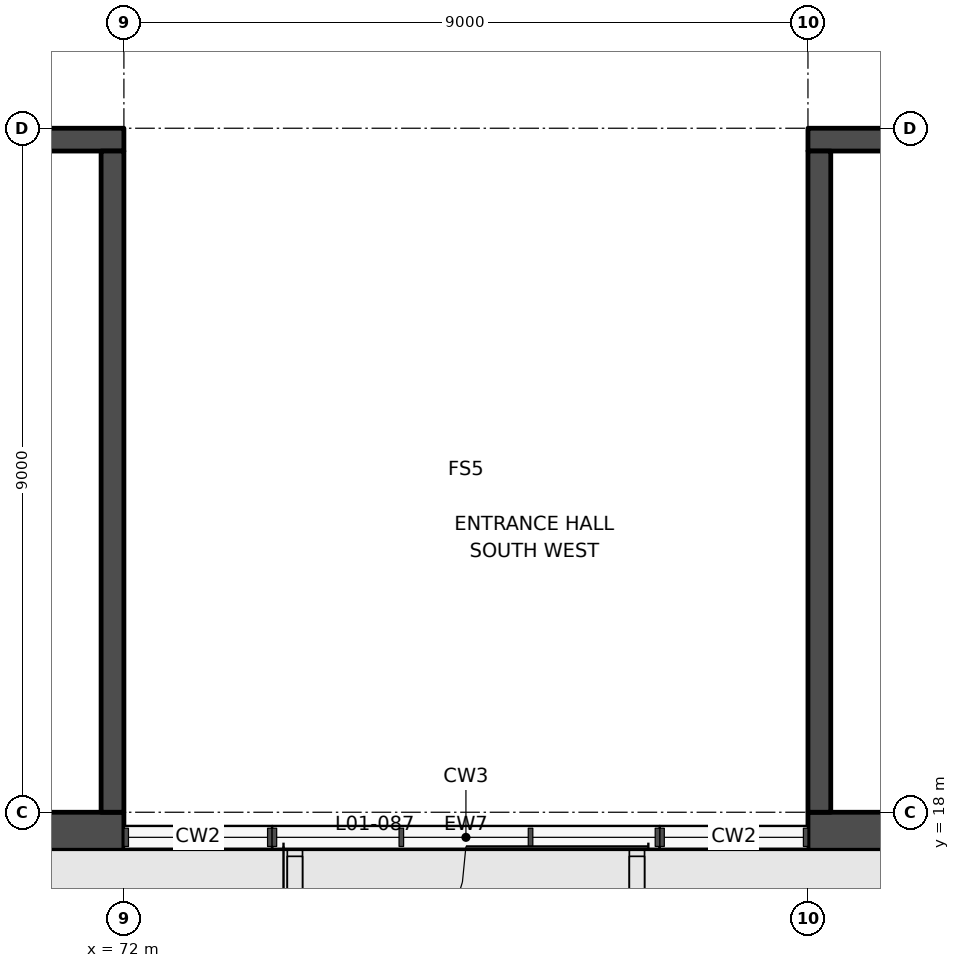
"""IFC4 building model, lengths in metres.
Left out: names, types, materials, properties, quantities, classifications, styles, units other than length and angle.
Written with IfcOpenShell. Run it as: python <this file> out.ifc"""

import sys

from ifc_helpers import new_model, si_unit, direction, frame, frame_2d, origin, place, context, subcontext, project, spatial, rectangle, extrude, element, fill, save


model = new_model("IFC4")
c1 = context("Model", 3, precision=1e-05, world=origin(), true_north=direction((0.0, 1.0)))
c2 = subcontext(c1, "Body", "Model", "MODEL_VIEW")
j1 = project(units=[si_unit("LENGTHUNIT", "METRE"), si_unit("PLANEANGLEUNIT", "RADIAN")], contexts=[c1])
p1 = place(None, origin())
s1 = spatial("IfcSite", under=j1, at=p1, CompositionType="ELEMENT")
p2 = place(p1, origin())
s2 = spatial("IfcBuilding", under=s1, at=p2, CompositionType="ELEMENT")
p3 = place(p2, frame((0.0, 0.0, 7.0)))
s3 = spatial("IfcBuildingStorey", under=s2, at=p3, CompositionType="ELEMENT", Elevation=7.0)
p4 = place(p3, frame((73.95, 17.55, 0.0), z_axis=(0.0, 0.0, 1.0), x_axis=(1.0, 0.0, 0.0)))
e1 = element("IfcWall", 1, at=p4, inside=s3, PredefinedType="SOLIDWALL", context=c2, shape_type="SweptSolid", body=[
    extrude(rectangle(XDim=5.1, YDim=0.1, at=frame_2d((2.55, 0.0))), origin(), (0.0, 0.0, 1.0), 3.1),
])
p5 = place(p4, frame((0.15, 0.0, 0.0)))
e2 = element("IfcOpeningElement", 2, at=p5, cuts=e1, PredefinedType="OPENING", context=c2, shape_type="SweptSolid", body=[
    extrude(rectangle(XDim=4.8, YDim=2.7, at=frame_2d((2.4, 1.35))), frame((0.0, 0.06, 0.0), z_axis=(0.0, -1.0, 0.0), x_axis=(1.0, 0.0, 0.0)), (0.0, 0.0, 1.0), 0.12),
])
p6 = place(p3, frame((81.0, 26.85, 0.0), z_axis=(0.0, 0.0, 1.0), x_axis=(1.0, 0.0, 0.0)))
e3 = element("IfcWall", 3, at=p6, inside=s3, PredefinedType="SHEAR", context=c2, shape_type="SweptSolid", body=[
    extrude(rectangle(XDim=18.0, YDim=0.3, at=frame_2d((9.0, 0.0))), origin(), (0.0, 0.0, 1.0), 4.5),
])
p7 = place(p6, frame((8.6, 0.0, 0.0)))
e4 = element("IfcOpeningElement", 4, at=p7, cuts=e3, PredefinedType="OPENING", context=c2, shape_type="SweptSolid", body=[
    extrude(rectangle(XDim=1.2, YDim=2.1, at=frame_2d((0.6, 1.05))), frame((0.0, 0.16, 0.0), z_axis=(0.0, -1.0, 0.0), x_axis=(1.0, 0.0, 0.0)), (0.0, 0.0, 1.0), 0.32),
])
p8 = place(p3, frame((81.0, 17.75, 0.0), z_axis=(0.0, 0.0, 1.0), x_axis=(1.0, 0.0, 0.0)))
e5 = element("IfcWall", 5, at=p8, inside=s3, PredefinedType="SHEAR", context=c2, shape_type="SweptSolid", body=[
    extrude(rectangle(XDim=18.0, YDim=0.5, at=frame_2d((9.0, 0.0))), origin(), (0.0, 0.0, 1.0), 4.5),
])
p9 = place(p3, frame((81.15, 26.7, 0.0), z_axis=(0.0, 0.0, 1.0), x_axis=(0.0, -1.0, 0.0)))
e6 = element("IfcWall", 6, at=p9, inside=s3, PredefinedType="SHEAR", context=c2, shape_type="SweptSolid", body=[
    extrude(rectangle(XDim=8.7, YDim=0.3, at=frame_2d((4.35, 0.0))), origin(), (0.0, 0.0, 1.0), 4.5),
])
p10 = place(p3, frame((72.0, 26.85, 0.0), z_axis=(0.0, 0.0, 1.0), x_axis=(-1.0, 0.0, 0.0)))
e7 = element("IfcWall", 7, at=p10, inside=s3, PredefinedType="SHEAR", context=c2, shape_type="SweptSolid", body=[
    extrude(rectangle(XDim=18.25, YDim=0.3, at=frame_2d((9.125, 0.0))), origin(), (0.0, 0.0, 1.0), 4.5),
])
p11 = place(p10, frame((8.6, 0.0, 0.0)))
e8 = element("IfcOpeningElement", 8, at=p11, cuts=e7, PredefinedType="OPENING", context=c2, shape_type="SweptSolid", body=[
    extrude(rectangle(XDim=1.2, YDim=2.1, at=frame_2d((0.6, 1.05))), frame((0.0, 0.16, 0.0), z_axis=(0.0, -1.0, 0.0), x_axis=(1.0, 0.0, 0.0)), (0.0, 0.0, 1.0), 0.32),
])
p12 = place(p3, frame((72.0, 17.75, 0.0), z_axis=(0.0, 0.0, 1.0), x_axis=(-1.0, 0.0, 0.0)))
e9 = element("IfcWall", 9, at=p12, inside=s3, PredefinedType="SHEAR", context=c2, shape_type="SweptSolid", body=[
    extrude(rectangle(XDim=18.0, YDim=0.5, at=frame_2d((9.0, 0.0))), origin(), (0.0, 0.0, 1.0), 4.5),
])
p13 = place(p3, frame((71.85, 26.7, 0.0), z_axis=(0.0, 0.0, 1.0), x_axis=(0.0, -1.0, 0.0)))
e10 = element("IfcWall", 10, at=p13, inside=s3, PredefinedType="SHEAR", context=c2, shape_type="SweptSolid", body=[
    extrude(rectangle(XDim=8.7, YDim=0.3, at=frame_2d((4.35, 0.0))), origin(), (0.0, 0.0, 1.0), 4.5),
])
p14 = place(p5, frame((4.8, 0.0, 0.0), z_axis=(0.0, 0.0, 1.0), x_axis=(-1.0, 0.0, 0.0)))
e11 = element("IfcDoor", 11, at=p14, inside=s3, OperationType="DOUBLE_DOOR_SINGLE_SWING", PredefinedType="DOOR", context=c2, shape_type="SweptSolid", body=[
    extrude(rectangle(XDim=4.8, YDim=2.7, at=frame_2d((2.4, 1.35))), frame((0.0, 0.025, 0.0), z_axis=(0.0, -1.0, 0.0), x_axis=(1.0, 0.0, 0.0)), (0.0, 0.0, 1.0), 0.05),
])
fill(e2, e11)
save(model, sys.argv[1])
